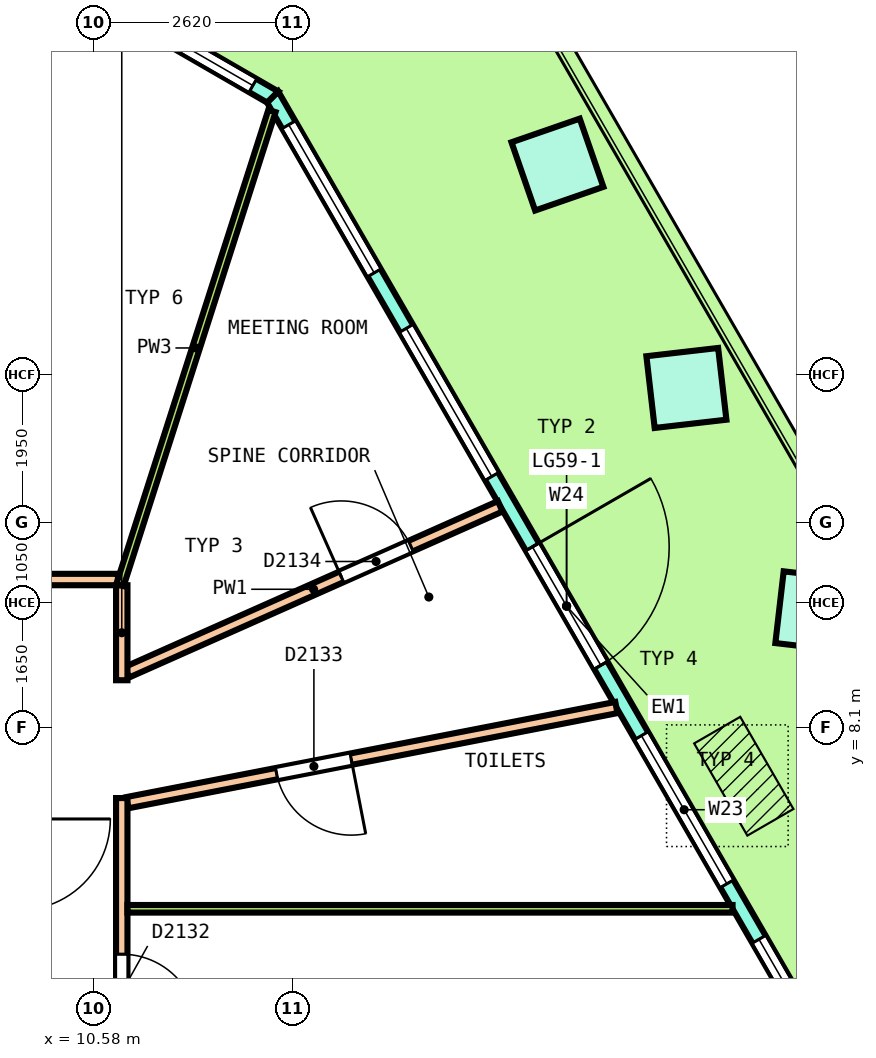
"""IFC4 building model, lengths in metres.
Left out: names, types, materials, properties, quantities, classifications, styles, units other than length and angle.
Written with IfcOpenShell. Run it as: python <this file> out.ifc"""

import sys

from ifc_helpers import new_model, si_unit, direction, frame, frame_2d, origin, origin_2d, place, context, subcontext, project, spatial, polyline, rectangle, outline, extrude, element, fill, save


model = new_model("IFC4")
c1 = context("Model", 3, precision=1e-05, world=origin(), true_north=direction((0.0, 1.0)))
c2 = subcontext(c1, "Body", "Model", "MODEL_VIEW")
j1 = project(units=[si_unit("LENGTHUNIT", "METRE"), si_unit("PLANEANGLEUNIT", "RADIAN")], contexts=[c1])
p1 = place(None, origin())
s1 = spatial("IfcSite", under=j1, at=p1, CompositionType="ELEMENT")
p2 = place(p1, origin())
s2 = spatial("IfcBuilding", under=s1, at=p2, CompositionType="ELEMENT")
p3 = place(p2, frame((0.0, 0.0, 271.0)))
s3 = spatial("IfcBuildingStorey", under=s2, at=p3, CompositionType="ELEMENT", Elevation=271.0)
p4 = place(p3, frame((20.075, 9.631, 0.0), z_axis=(0.025405304683, 0.018920266383, 0.999498171091), x_axis=(-0.501003025271, 0.865437843341, -0.003648010707)))
e1 = element("IfcColumn", 1, at=p4, inside=s3, PredefinedType="COLUMN", context=c2, shape_type="SweptSolid", body=[
    extrude(rectangle(XDim=0.95, YDim=0.95, at=origin_2d()), origin(), (0.0, 0.0, 1.0), 3.652),
])
p5 = place(p3, frame((18.379, 12.57, 0.0), z_axis=(0.029015583354, 0.012568962375, 0.99949993352), x_axis=(-0.499848966802, 0.86610502362, 0.003619177736)))
e2 = element("IfcColumn", 2, at=p5, inside=s3, PredefinedType="COLUMN", context=c2, shape_type="SweptSolid", body=[
    extrude(rectangle(XDim=0.95, YDim=0.95, at=origin_2d()), origin(), (0.0, 0.0, 1.0), 3.652),
])
p6 = place(p3, frame((16.682, 15.509, 0.0), z_axis=(0.032624119908, 0.006284154245, 0.999447935715), x_axis=(-0.500036299202, 0.865936128062, 0.010877573109)))
e3 = element("IfcColumn", 3, at=p6, inside=s3, PredefinedType="COLUMN", context=c2, shape_type="SweptSolid", body=[
    extrude(rectangle(XDim=0.95, YDim=0.95, at=origin_2d()), origin(), (0.0, 0.0, 1.0), 3.652),
])
p7 = place(p3, frame((20.669, 3.003, 0.0), z_axis=(0.0, 0.0, 1.0), x_axis=(-0.500001185373, 0.866024719408, 0.0)))
e4 = element("IfcWall", 4, at=p7, inside=s3, PredefinedType="SOLIDWALL", context=c2, shape_type="SweptSolid", body=[
    extrude(outline(polyline([(-0.027, -0.1), (1.008, -0.1), (2.043, -0.1), (3.077, -0.1), (4.112, -0.1), (5.147, -0.1), (6.182, -0.1), (7.216, -0.1), (8.251, -0.1), (9.286, -0.1), (10.321, -0.1), (11.355, -0.1), (12.39, -0.1), (13.425, -0.1), (14.459, -0.1), (15.494, -0.1), (15.44, 0.1), (14.413, 0.1), (13.385, 0.1), (12.358, 0.1), (11.33, 0.1), (10.302, 0.1), (9.275, 0.1), (8.247, 0.1), (7.22, 0.1), (6.192, 0.1), (5.165, 0.1), (4.137, 0.1), (3.11, 0.1), (2.082, 0.1), (1.054, 0.1), (0.027, 0.1), (-0.027, -0.1)])), origin(), (0.0, 0.0, 1.0), 3.7),
])
p8 = place(p7, frame((0.422, 0.0, 0.1)))
e5 = element("IfcOpeningElement", 5, at=p8, cuts=e4, PredefinedType="OPENING", context=c2, shape_type="SweptSolid", body=[
    extrude(rectangle(XDim=2.25, YDim=2.75, at=frame_2d((1.125, 1.375))), frame((0.0, 0.11, 0.0), z_axis=(0.0, -1.0, 0.0), x_axis=(1.0, 0.0, 0.0)), (0.0, 0.0, 1.0), 0.22),
])
p9 = place(p7, frame((3.515, 0.0, 0.1)))
e6 = element("IfcOpeningElement", 6, at=p9, cuts=e4, PredefinedType="OPENING", context=c2, shape_type="SweptSolid", body=[
    extrude(rectangle(XDim=2.25, YDim=2.75, at=frame_2d((1.125, 1.375))), frame((0.0, 0.11, 0.0), z_axis=(0.0, -1.0, 0.0), x_axis=(1.0, 0.0, 0.0)), (0.0, 0.0, 1.0), 0.22),
])
p10 = place(p7, frame((6.834, 0.0, 0.0)))
e7 = element("IfcOpeningElement", 7, at=p10, cuts=e4, PredefinedType="OPENING", context=c2, shape_type="SweptSolid", body=[
    extrude(rectangle(XDim=1.8, YDim=2.4, at=frame_2d((0.9, 1.2))), frame((0.0, 0.11, 0.0), z_axis=(0.0, -1.0, 0.0), x_axis=(1.0, 0.0, 0.0)), (0.0, 0.0, 1.0), 0.22),
])
p11 = place(p7, frame((6.834, 0.0, 2.55)))
e8 = element("IfcOpeningElement", 8, at=p11, cuts=e4, PredefinedType="OPENING", context=c2, shape_type="SweptSolid", body=[
    extrude(rectangle(XDim=1.8, YDim=0.3, at=frame_2d((0.9, 0.15))), frame((0.0, 0.11, 0.0), z_axis=(0.0, -1.0, 0.0), x_axis=(1.0, 0.0, 0.0)), (0.0, 0.0, 1.0), 0.22),
])
p12 = place(p7, frame((9.702, 0.0, 0.1)))
e9 = element("IfcOpeningElement", 9, at=p12, cuts=e4, PredefinedType="OPENING", context=c2, shape_type="SweptSolid", body=[
    extrude(rectangle(XDim=2.25, YDim=2.75, at=frame_2d((1.125, 1.375))), frame((0.0, 0.11, 0.0), z_axis=(0.0, -1.0, 0.0), x_axis=(1.0, 0.0, 0.0)), (0.0, 0.0, 1.0), 0.22),
])
p13 = place(p7, frame((12.796, 0.0, 0.1)))
e10 = element("IfcOpeningElement", 10, at=p13, cuts=e4, PredefinedType="OPENING", context=c2, shape_type="SweptSolid", body=[
    extrude(rectangle(XDim=2.25, YDim=2.75, at=frame_2d((1.125, 1.375))), frame((0.0, 0.11, 0.0), z_axis=(0.0, -1.0, 0.0), x_axis=(1.0, 0.0, 0.0)), (0.0, 0.0, 1.0), 0.22),
])
p14 = place(p3, frame((12.935, 16.398, 0.0), z_axis=(0.0, 0.0, 1.0), x_axis=(-0.866026017613, 0.499998936816, 0.0)))
e11 = element("IfcWall", 11, at=p14, inside=s3, PredefinedType="SOLIDWALL", context=c2, shape_type="SweptSolid", body=[
    extrude(outline(polyline([(-0.027, -0.1), (1.084, -0.1), (2.196, -0.1), (3.307, -0.1), (4.419, -0.1), (5.53, -0.1), (5.477, 0.1), (4.387, 0.1), (3.297, 0.1), (2.207, 0.1), (1.117, 0.1), (0.027, 0.1), (-0.027, -0.1)])), origin(), (0.0, 0.0, 1.0), 3.7),
])
p15 = place(p14, frame((0.301, 0.0, 0.1)))
e12 = element("IfcOpeningElement", 12, at=p15, cuts=e11, PredefinedType="OPENING", context=c2, shape_type="SweptSolid", body=[
    extrude(rectangle(XDim=2.15, YDim=2.75, at=frame_2d((1.075, 1.375))), frame((0.0, 0.11, 0.0), z_axis=(0.0, -1.0, 0.0), x_axis=(1.0, 0.0, 0.0)), (0.0, 0.0, 1.0), 0.22),
])
p16 = place(p14, frame((3.052, 0.0, 0.1)))
e13 = element("IfcOpeningElement", 13, at=p16, cuts=e11, PredefinedType="OPENING", context=c2, shape_type="SweptSolid", body=[
    extrude(rectangle(XDim=2.15, YDim=2.75, at=frame_2d((1.075, 1.375))), frame((0.0, 0.11, 0.0), z_axis=(0.0, -1.0, 0.0), x_axis=(1.0, 0.0, 0.0)), (0.0, 0.0, 1.0), 0.22),
])
p17 = place(p3, frame((11.024, 7.114, 0.0), z_axis=(0.0, 0.0, 1.0), x_axis=(0.981587463139, 0.191013225219, 0.0)))
e14 = element("IfcWall", 14, at=p17, inside=s3, PredefinedType="PARTITIONING", context=c2, shape_type="SweptSolid", body=[
    extrude(rectangle(XDim=6.554, YDim=0.15, at=frame_2d((3.277, 0.0))), origin(), (0.0, 0.0, 1.0), 2.9),
])
p18 = place(p17, frame((2.0, 0.0, 0.0)))
e15 = element("IfcOpeningElement", 15, at=p18, cuts=e14, PredefinedType="OPENING", context=c2, shape_type="SweptSolid", body=[
    extrude(rectangle(XDim=1.0, YDim=2.1, at=frame_2d((0.5, 1.05))), frame((0.0, 0.085, 0.0), z_axis=(0.0, -1.0, 0.0), x_axis=(1.0, 0.0, 0.0)), (0.0, 0.0, 1.0), 0.17),
])
p19 = place(p3, frame((11.019, 8.831, 0.0), z_axis=(0.0, 0.0, 1.0), x_axis=(0.913796559749, 0.406172189338, 0.0)))
e16 = element("IfcWall", 16, at=p19, inside=s3, PredefinedType="PARTITIONING", context=c2, shape_type="SweptSolid", body=[
    extrude(rectangle(XDim=5.374, YDim=0.15, at=frame_2d((2.687, 0.0))), origin(), (0.0, 0.0, 1.0), 2.9),
])
p20 = place(p19, frame((3.086, 0.0, 0.0)))
e17 = element("IfcOpeningElement", 17, at=p20, cuts=e16, PredefinedType="OPENING", context=c2, shape_type="SweptSolid", body=[
    extrude(rectangle(XDim=1.0, YDim=2.1, at=frame_2d((0.5, 1.05))), frame((0.0, 0.085, 0.0), z_axis=(0.0, -1.0, 0.0), x_axis=(1.0, 0.0, 0.0)), (0.0, 0.0, 1.0), 0.17),
])
p21 = place(p3, frame((10.95, -9.975, 0.0), z_axis=(0.0, 0.0, 1.0), x_axis=(0.0, 1.0, 0.0)))
e18 = element("IfcWall", 18, at=p21, inside=s3, PredefinedType="PARTITIONING", context=c2, shape_type="SweptSolid", body=[
    extrude(rectangle(XDim=17.15, YDim=0.15, at=frame_2d((8.575, 0.0))), origin(), (0.0, 0.0, 1.0), 2.9),
])
p22 = place(p21, frame((10.954, 0.0, 0.0)))
e19 = element("IfcOpeningElement", 19, at=p22, cuts=e18, PredefinedType="OPENING", context=c2, shape_type="SweptSolid", body=[
    extrude(rectangle(XDim=1.0, YDim=2.1, at=frame_2d((0.5, 1.05))), frame((0.0, 0.085, 0.0), z_axis=(0.0, -1.0, 0.0), x_axis=(1.0, 0.0, 0.0)), (0.0, 0.0, 1.0), 0.17),
])
p23 = place(p21, frame((14.096, 0.0, 0.0)))
e20 = element("IfcOpeningElement", 20, at=p23, cuts=e18, PredefinedType="OPENING", context=c2, shape_type="SweptSolid", body=[
    extrude(rectangle(XDim=1.0, YDim=2.1, at=frame_2d((0.5, 1.05))), frame((0.0, 0.085, 0.0), z_axis=(0.0, -1.0, 0.0), x_axis=(1.0, 0.0, 0.0)), (0.0, 0.0, 1.0), 0.17),
])
p24 = place(p21, frame((2.86, 0.0, 0.0)))
e21 = element("IfcOpeningElement", 21, at=p24, cuts=e18, PredefinedType="OPENING", context=c2, shape_type="SweptSolid", body=[
    extrude(rectangle(XDim=1.0, YDim=2.1, at=frame_2d((0.5, 1.05))), frame((0.0, 0.085, 0.0), z_axis=(0.0, -1.0, 0.0), x_axis=(1.0, 0.0, 0.0)), (0.0, 0.0, 1.0), 0.17),
])
p25 = place(p21, frame((5.357, 0.0, 0.0)))
e22 = element("IfcOpeningElement", 22, at=p25, cuts=e18, PredefinedType="OPENING", context=c2, shape_type="SweptSolid", body=[
    extrude(rectangle(XDim=1.0, YDim=2.1, at=frame_2d((0.5, 1.05))), frame((0.0, 0.085, 0.0), z_axis=(0.0, -1.0, 0.0), x_axis=(1.0, 0.0, 0.0)), (0.0, 0.0, 1.0), 0.17),
])
p26 = place(p21, frame((8.337, 0.0, 0.0)))
e23 = element("IfcOpeningElement", 23, at=p26, cuts=e18, PredefinedType="OPENING", context=c2, shape_type="SweptSolid", body=[
    extrude(rectangle(XDim=1.0, YDim=2.1, at=frame_2d((0.5, 1.05))), frame((0.0, 0.085, 0.0), z_axis=(0.0, -1.0, 0.0), x_axis=(1.0, 0.0, 0.0)), (0.0, 0.0, 1.0), 0.17),
])
p27 = place(p3, frame((10.95, 8.725, 0.0), z_axis=(0.0, 0.0, 1.0), x_axis=(0.0, 1.0, 0.0)))
e24 = element("IfcWall", 24, at=p27, inside=s3, PredefinedType="PARTITIONING", context=c2, shape_type="SweptSolid", body=[
    extrude(rectangle(XDim=1.25, YDim=0.15, at=frame_2d((0.625, 0.0))), origin(), (0.0, 0.0, 1.0), 3.7),
])
p28 = place(p3, frame((-10.875, 10.05, 0.0), z_axis=(0.0, 0.0, 1.0), x_axis=(1.0, 0.0, 0.0)))
e25 = element("IfcWall", 25, at=p28, inside=s3, PredefinedType="PARTITIONING", context=c2, shape_type="SweptSolid", body=[
    extrude(rectangle(XDim=21.775, YDim=0.15, at=frame_2d((10.887, 0.0))), origin(), (0.0, 0.0, 1.0), 2.9),
])
p29 = place(p28, frame((17.089, 0.0, 0.0)))
e26 = element("IfcOpeningElement", 26, at=p29, cuts=e25, PredefinedType="OPENING", context=c2, shape_type="SweptSolid", body=[
    extrude(rectangle(XDim=1.2, YDim=2.1, at=frame_2d((0.6, 1.05))), frame((0.0, 0.085, 0.0), z_axis=(0.0, -1.0, 0.0), x_axis=(1.0, 0.0, 0.0)), (0.0, 0.0, 1.0), 0.17),
])
p30 = place(p28, frame((14.048, 0.0, 0.0)))
e27 = element("IfcOpeningElement", 27, at=p30, cuts=e25, PredefinedType="OPENING", context=c2, shape_type="SweptSolid", body=[
    extrude(rectangle(XDim=1.0, YDim=2.1, at=frame_2d((0.5, 1.05))), frame((0.0, 0.085, 0.0), z_axis=(0.0, -1.0, 0.0), x_axis=(1.0, 0.0, 0.0)), (0.0, 0.0, 1.0), 0.17),
])
p31 = place(p28, frame((7.521, 0.0, 0.0)))
e28 = element("IfcOpeningElement", 28, at=p31, cuts=e25, PredefinedType="OPENING", context=c2, shape_type="SweptSolid", body=[
    extrude(rectangle(XDim=1.0, YDim=2.1, at=frame_2d((0.5, 1.05))), frame((0.0, 0.085, 0.0), z_axis=(0.0, -1.0, 0.0), x_axis=(1.0, 0.0, 0.0)), (0.0, 0.0, 1.0), 0.17),
])
p32 = place(p28, frame((4.213, 0.0, 0.0)))
e29 = element("IfcOpeningElement", 29, at=p32, cuts=e25, PredefinedType="OPENING", context=c2, shape_type="SweptSolid", body=[
    extrude(rectangle(XDim=1.0, YDim=2.1, at=frame_2d((0.5, 1.05))), frame((0.0, 0.085, 0.0), z_axis=(0.0, -1.0, 0.0), x_axis=(1.0, 0.0, 0.0)), (0.0, 0.0, 1.0), 0.17),
])
p33 = place(p28, frame((1.082, 0.0, 0.0)))
e30 = element("IfcOpeningElement", 30, at=p33, cuts=e25, PredefinedType="OPENING", context=c2, shape_type="SweptSolid", body=[
    extrude(rectangle(XDim=1.0, YDim=2.1, at=frame_2d((0.5, 1.05))), frame((0.0, 0.085, 0.0), z_axis=(0.0, -1.0, 0.0), x_axis=(1.0, 0.0, 0.0)), (0.0, 0.0, 1.0), 0.17),
])
p34 = place(p3, frame((11.025, 5.718, 0.0), z_axis=(0.0, 0.0, 1.0), x_axis=(1.0, 0.0, 0.0)))
e31 = element("IfcWall", 31, at=p34, inside=s3, PredefinedType="PARTITIONING", context=c2, shape_type="SweptSolid", body=[
    extrude(rectangle(XDim=7.961, YDim=0.1, at=frame_2d((3.98, 0.0))), origin(), (0.0, 0.0, 1.0), 2.9),
])
p35 = place(p3, frame((10.927, 9.979, 0.0), z_axis=(0.0, 0.0, 1.0), x_axis=(0.305268095112, 0.952266449113, 0.0)))
e32 = element("IfcWall", 32, at=p35, inside=s3, PredefinedType="PARTITIONING", context=c2, shape_type="SweptSolid", body=[
    extrude(rectangle(XDim=6.548, YDim=0.1, at=frame_2d((3.274, 0.0))), origin(), (0.0, 0.0, 1.0), 2.9),
])
p36 = place(p8, origin())
e33 = element("IfcWindow", 33, at=p36, inside=s3, PartitioningType="SINGLE_PANEL", PredefinedType="WINDOW", context=c2, shape_type="SweptSolid", body=[
    extrude(rectangle(XDim=2.25, YDim=2.75, at=frame_2d((1.125, 1.375))), frame((0.0, 0.03, 0.0), z_axis=(0.0, -1.0, 0.0), x_axis=(1.0, 0.0, 0.0)), (0.0, 0.0, 1.0), 0.06),
])
fill(e5, e33)
p37 = place(p9, origin())
e34 = element("IfcWindow", 34, at=p37, inside=s3, PartitioningType="SINGLE_PANEL", PredefinedType="WINDOW", context=c2, shape_type="SweptSolid", body=[
    extrude(rectangle(XDim=2.25, YDim=2.75, at=frame_2d((1.125, 1.375))), frame((0.0, 0.03, 0.0), z_axis=(0.0, -1.0, 0.0), x_axis=(1.0, 0.0, 0.0)), (0.0, 0.0, 1.0), 0.06),
])
fill(e6, e34)
p38 = place(p10, origin())
e35 = element("IfcDoor", 35, at=p38, inside=s3, OperationType="DOUBLE_DOOR_SINGLE_SWING", PredefinedType="DOOR", context=c2, shape_type="SweptSolid", body=[
    extrude(rectangle(XDim=1.8, YDim=2.4, at=frame_2d((0.9, 1.2))), frame((0.0, 0.025, 0.0), z_axis=(0.0, -1.0, 0.0), x_axis=(1.0, 0.0, 0.0)), (0.0, 0.0, 1.0), 0.05),
])
fill(e7, e35)
p39 = place(p11, origin())
e36 = element("IfcWindow", 36, at=p39, inside=s3, PartitioningType="SINGLE_PANEL", PredefinedType="WINDOW", context=c2, shape_type="SweptSolid", body=[
    extrude(rectangle(XDim=1.8, YDim=0.3, at=frame_2d((0.9, 0.15))), frame((0.0, 0.03, 0.0), z_axis=(0.0, -1.0, 0.0), x_axis=(1.0, 0.0, 0.0)), (0.0, 0.0, 1.0), 0.06),
])
fill(e8, e36)
p40 = place(p12, origin())
e37 = element("IfcWindow", 37, at=p40, inside=s3, PartitioningType="SINGLE_PANEL", PredefinedType="WINDOW", context=c2, shape_type="SweptSolid", body=[
    extrude(rectangle(XDim=2.25, YDim=2.75, at=frame_2d((1.125, 1.375))), frame((0.0, 0.03, 0.0), z_axis=(0.0, -1.0, 0.0), x_axis=(1.0, 0.0, 0.0)), (0.0, 0.0, 1.0), 0.06),
])
fill(e9, e37)
p41 = place(p13, origin())
e38 = element("IfcWindow", 38, at=p41, inside=s3, PartitioningType="SINGLE_PANEL", PredefinedType="WINDOW", context=c2, shape_type="SweptSolid", body=[
    extrude(rectangle(XDim=2.25, YDim=2.75, at=frame_2d((1.125, 1.375))), frame((0.0, 0.03, 0.0), z_axis=(0.0, -1.0, 0.0), x_axis=(1.0, 0.0, 0.0)), (0.0, 0.0, 1.0), 0.06),
])
fill(e10, e38)
p42 = place(p15, origin())
e39 = element("IfcWindow", 39, at=p42, inside=s3, PartitioningType="SINGLE_PANEL", PredefinedType="WINDOW", context=c2, shape_type="SweptSolid", body=[
    extrude(rectangle(XDim=2.15, YDim=2.75, at=frame_2d((1.075, 1.375))), frame((0.0, 0.03, 0.0), z_axis=(0.0, -1.0, 0.0), x_axis=(1.0, 0.0, 0.0)), (0.0, 0.0, 1.0), 0.06),
])
fill(e12, e39)
p43 = place(p23, origin())
e40 = element("IfcDoor", 40, at=p43, inside=s3, OperationType="SINGLE_SWING_LEFT", PredefinedType="DOOR", context=c2, shape_type="SweptSolid", body=[
    extrude(rectangle(XDim=1.0, YDim=2.1, at=frame_2d((0.5, 1.05))), frame((0.0, 0.025, 0.0), z_axis=(0.0, -1.0, 0.0), x_axis=(1.0, 0.0, 0.0)), (0.0, 0.0, 1.0), 0.05),
])
fill(e20, e40)
p44 = place(p18, origin())
e41 = element("IfcDoor", 41, at=p44, inside=s3, OperationType="SINGLE_SWING_RIGHT", PredefinedType="DOOR", context=c2, shape_type="SweptSolid", body=[
    extrude(rectangle(XDim=1.0, YDim=2.1, at=frame_2d((0.5, 1.05))), frame((0.0, 0.025, 0.0), z_axis=(0.0, -1.0, 0.0), x_axis=(1.0, 0.0, 0.0)), (0.0, 0.0, 1.0), 0.05),
])
fill(e15, e41)
p45 = place(p20, origin())
e42 = element("IfcDoor", 42, at=p45, inside=s3, OperationType="SINGLE_SWING_LEFT", PredefinedType="DOOR", context=c2, shape_type="SweptSolid", body=[
    extrude(rectangle(XDim=1.0, YDim=2.1, at=frame_2d((0.5, 1.05))), frame((0.0, 0.025, 0.0), z_axis=(0.0, -1.0, 0.0), x_axis=(1.0, 0.0, 0.0)), (0.0, 0.0, 1.0), 0.05),
])
fill(e17, e42)
save(model, sys.argv[1])
